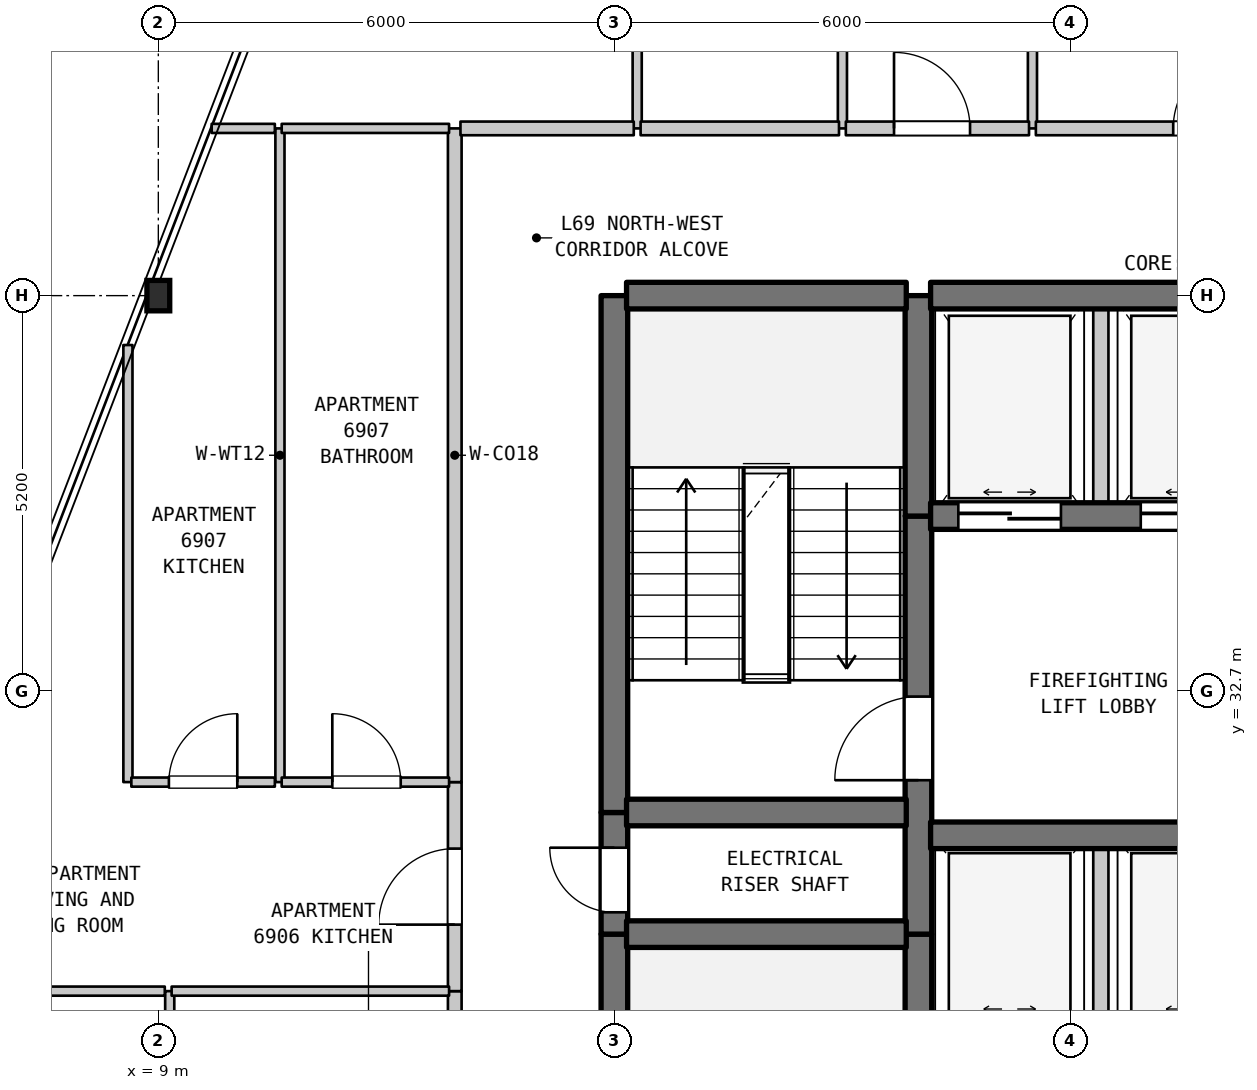
"""IFC4 building model, lengths in metres.
Left out: names, types, materials, properties, quantities, classifications, styles, units other than length and angle.
Written with IfcOpenShell. Run it as: python <this file> out.ifc"""

import sys

from ifc_helpers import new_model, si_unit, direction, frame, frame_2d, origin, origin_2d, place, context, subcontext, project, spatial, rectangle, i_section, extrude, element, fill, save


model = new_model("IFC4")
c1 = context("Model", 3, precision=1e-05, world=origin(), true_north=direction((0.0, 1.0)))
c2 = subcontext(c1, "Body", "Model", "MODEL_VIEW")
j1 = project(units=[si_unit("LENGTHUNIT", "METRE"), si_unit("PLANEANGLEUNIT", "RADIAN")], contexts=[c1])
p1 = place(None, origin())
s1 = spatial("IfcSite", under=j1, at=p1, CompositionType="ELEMENT")
p2 = place(p1, origin())
s2 = spatial("IfcBuilding", under=s1, at=p2, CompositionType="ELEMENT")
p3 = place(p2, frame((0.0, 0.0, 276.9)))
s3 = spatial("IfcBuildingStorey", under=s2, at=p3, CompositionType="ELEMENT", Elevation=276.9)
p4 = place(p3, frame((9.0, 37.9, 0.0), z_axis=(0.0, 0.0, 1.0), x_axis=(1.0, 0.0, 0.0)))
e1 = element("IfcColumn", 1, at=p4, inside=s3, PredefinedType="COLUMN", context=c2, shape_type="SweptSolid", body=[
    extrude(i_section(OverallWidth=0.3, OverallDepth=0.4, WebThickness=0.013, FlangeThickness=0.024, FilletRadius=0.027, at=origin_2d()), origin(), (0.0, 0.0, 1.0), 3.7),
])
p5 = place(p3, frame((8.6, 31.5, 0.0), z_axis=(0.0, 0.0, 1.0), x_axis=(0.0, 1.0, 0.0)))
e2 = element("IfcWall", 2, at=p5, inside=s3, PredefinedType="PARTITIONING", context=c2, shape_type="SweptSolid", body=[
    extrude(rectangle(XDim=5.75, YDim=0.12, at=frame_2d((2.875, 0.0))), origin(), (0.0, 0.0, 1.0), 3.39),
])
p6 = place(p3, frame((9.15, 28.4, 0.0), z_axis=(0.0, 0.0, 1.0), x_axis=(0.0, 1.0, 0.0)))
e3 = element("IfcWall", 3, at=p6, inside=s3, PredefinedType="PARTITIONING", context=c2, shape_type="SweptSolid", body=[
    extrude(rectangle(XDim=0.35, YDim=0.12, at=frame_2d((0.175, 0.0))), origin(), (0.0, 0.0, 1.0), 3.39),
])
p7 = place(p3, frame((10.6, 31.5, 0.0), z_axis=(0.0, 0.0, 1.0), x_axis=(0.0, 1.0, 0.0)))
e4 = element("IfcWall", 4, at=p7, inside=s3, PredefinedType="PARTITIONING", context=c2, shape_type="SweptSolid", body=[
    extrude(rectangle(XDim=8.6, YDim=0.12, at=frame_2d((4.3, 0.0))), origin(), (0.0, 0.0, 1.0), 3.39),
])
p8 = place(p3, frame((12.9, 28.4, 0.0), z_axis=(0.0, 0.0, 1.0), x_axis=(0.0, 1.0, 0.0)))
e5 = element("IfcWall", 5, at=p8, inside=s3, PredefinedType="STANDARD", context=c2, shape_type="SweptSolid", body=[
    extrude(rectangle(XDim=0.35, YDim=0.18, at=frame_2d((0.175, 0.0))), origin(), (0.0, 0.0, 1.0), 3.39),
])
p9 = place(p3, frame((12.9, 28.75, 0.0), z_axis=(0.0, 0.0, 1.0), x_axis=(0.0, 1.0, 0.0)))
e6 = element("IfcWall", 6, at=p9, inside=s3, PredefinedType="STANDARD", context=c2, shape_type="SweptSolid", body=[
    extrude(rectangle(XDim=2.75, YDim=0.18, at=frame_2d((1.375, 0.0))), origin(), (0.0, 0.0, 1.0), 3.39),
])
p10 = place(p9, frame((0.875, 0.0, 0.0)))
e7 = element("IfcOpeningElement", 7, at=p10, cuts=e6, PredefinedType="OPENING", context=c2, shape_type="SweptSolid", body=[
    extrude(rectangle(XDim=1.0, YDim=2.15, at=frame_2d((0.5, 1.075))), frame((0.0, 0.1, 0.0), z_axis=(0.0, -1.0, 0.0), x_axis=(1.0, 0.0, 0.0)), (0.0, 0.0, 1.0), 0.2),
])
p11 = place(p3, frame((12.9, 31.5, 0.0), z_axis=(0.0, 0.0, 1.0), x_axis=(0.0, 1.0, 0.0)))
e8 = element("IfcWall", 8, at=p11, inside=s3, PredefinedType="STANDARD", context=c2, shape_type="SweptSolid", body=[
    extrude(rectangle(XDim=8.6, YDim=0.18, at=frame_2d((4.3, 0.0))), origin(), (0.0, 0.0, 1.0), 3.39),
])
p12 = place(p3, frame((15.0, 22.7, 0.0), z_axis=(0.0, 0.0, 1.0), x_axis=(0.0, 1.0, 0.0)))
e9 = element("IfcWall", 9, at=p12, inside=s3, PredefinedType="SHEAR", context=c2, shape_type="SweptSolid", body=[
    extrude(rectangle(XDim=6.8, YDim=0.35, at=frame_2d((3.4, 0.0))), origin(), (0.0, 0.0, 1.0), 3.39),
])
p13 = place(p3, frame((15.0, 29.5, 0.0), z_axis=(0.0, 0.0, 1.0), x_axis=(0.0, 1.0, 0.0)))
e10 = element("IfcWall", 10, at=p13, inside=s3, PredefinedType="SHEAR", context=c2, shape_type="SweptSolid", body=[
    extrude(rectangle(XDim=1.6, YDim=0.35, at=frame_2d((0.8, 0.0))), origin(), (0.0, 0.0, 1.0), 3.39),
])
p14 = place(p13, frame((0.287, 0.0, 0.0)))
e11 = element("IfcOpeningElement", 11, at=p14, cuts=e10, PredefinedType="OPENING", context=c2, shape_type="SweptSolid", body=[
    extrude(rectangle(XDim=0.85, YDim=2.1, at=frame_2d((0.425, 1.05))), frame((0.0, 0.185, 0.0), z_axis=(0.0, -1.0, 0.0), x_axis=(1.0, 0.0, 0.0)), (0.0, 0.0, 1.0), 0.37),
])
p15 = place(p3, frame((15.0, 31.1, 0.0), z_axis=(0.0, 0.0, 1.0), x_axis=(0.0, 1.0, 0.0)))
e12 = element("IfcWall", 12, at=p15, inside=s3, PredefinedType="SHEAR", context=c2, shape_type="SweptSolid", body=[
    extrude(rectangle(XDim=6.8, YDim=0.35, at=frame_2d((3.4, 0.0))), origin(), (0.0, 0.0, 1.0), 3.39),
])
p16 = place(p3, frame((15.3, 40.1, 0.0), z_axis=(0.0, 0.0, 1.0), x_axis=(0.0, 1.0, 0.0)))
e13 = element("IfcWall", 13, at=p16, inside=s3, PredefinedType="PARTITIONING", context=c2, shape_type="SweptSolid", body=[
    extrude(rectangle(XDim=3.2, YDim=0.12, at=frame_2d((1.6, 0.0))), origin(), (0.0, 0.0, 1.0), 3.39),
])
p17 = place(p3, frame((18.0, 40.1, 0.0), z_axis=(0.0, 0.0, 1.0), x_axis=(0.0, 1.0, 0.0)))
e14 = element("IfcWall", 14, at=p17, inside=s3, PredefinedType="PARTITIONING", context=c2, shape_type="SweptSolid", body=[
    extrude(rectangle(XDim=3.2, YDim=0.12, at=frame_2d((1.6, 0.0))), origin(), (0.0, 0.0, 1.0), 3.39),
])
p18 = place(p17, frame((1.15, 0.0, 0.0)))
e15 = element("IfcOpeningElement", 15, at=p18, cuts=e14, PredefinedType="OPENING", context=c2, shape_type="SweptSolid", body=[
    extrude(rectangle(XDim=0.9, YDim=2.15, at=frame_2d((0.45, 1.075))), frame((0.0, 0.07, 0.0), z_axis=(0.0, -1.0, 0.0), x_axis=(1.0, 0.0, 0.0)), (0.0, 0.0, 1.0), 0.14),
])
p19 = place(p3, frame((19.0, 28.2, 0.0), z_axis=(0.0, 0.0, 1.0), x_axis=(0.0, 1.0, 0.0)))
e16 = element("IfcWall", 16, at=p19, inside=s3, PredefinedType="SHEAR", context=c2, shape_type="SweptSolid", body=[
    extrude(rectangle(XDim=1.3, YDim=0.35, at=frame_2d((0.65, 0.0))), origin(), (0.0, 0.0, 1.0), 3.39),
])
p20 = place(p3, frame((19.0, 29.5, 0.0), z_axis=(0.0, 0.0, 1.0), x_axis=(0.0, 1.0, 0.0)))
e17 = element("IfcWall", 17, at=p20, inside=s3, PredefinedType="SHEAR", context=c2, shape_type="SweptSolid", body=[
    extrude(rectangle(XDim=5.5, YDim=0.35, at=frame_2d((2.75, 0.0))), origin(), (0.0, 0.0, 1.0), 3.39),
])
p21 = place(p20, frame((2.025, 0.0, 0.0)))
e18 = element("IfcOpeningElement", 18, at=p21, cuts=e17, PredefinedType="OPENING", context=c2, shape_type="SweptSolid", body=[
    extrude(rectangle(XDim=1.1, YDim=2.15, at=frame_2d((0.55, 1.075))), frame((0.0, 0.185, 0.0), z_axis=(0.0, -1.0, 0.0), x_axis=(1.0, 0.0, 0.0)), (0.0, 0.0, 1.0), 0.37),
])
p22 = place(p3, frame((19.0, 35.0, 0.0), z_axis=(0.0, 0.0, 1.0), x_axis=(0.0, 1.0, 0.0)))
e19 = element("IfcWall", 19, at=p22, inside=s3, PredefinedType="SHEAR", context=c2, shape_type="SweptSolid", body=[
    extrude(rectangle(XDim=2.9, YDim=0.35, at=frame_2d((1.45, 0.0))), origin(), (0.0, 0.0, 1.0), 3.39),
])
p23 = place(p3, frame((20.5, 40.1, 0.0), z_axis=(0.0, 0.0, 1.0), x_axis=(0.0, 1.0, 0.0)))
e20 = element("IfcWall", 20, at=p23, inside=s3, PredefinedType="PARTITIONING", context=c2, shape_type="SweptSolid", body=[
    extrude(rectangle(XDim=2.05, YDim=0.12, at=frame_2d((1.025, 0.0))), origin(), (0.0, 0.0, 1.0), 3.39),
])
p24 = place(p3, frame((21.4, 28.2, 0.0), z_axis=(0.0, 0.0, 1.0), x_axis=(0.0, 1.0, 0.0)))
e21 = element("IfcWall", 21, at=p24, inside=s3, PredefinedType="STANDARD", context=c2, shape_type="SweptSolid", body=[
    extrude(rectangle(XDim=2.6, YDim=0.2, at=frame_2d((1.3, 0.0))), origin(), (0.0, 0.0, 1.0), 3.39),
])
p25 = place(p3, frame((21.4, 35.0, 0.0), z_axis=(0.0, 0.0, 1.0), x_axis=(0.0, 1.0, 0.0)))
e22 = element("IfcWall", 22, at=p25, inside=s3, PredefinedType="STANDARD", context=c2, shape_type="SweptSolid", body=[
    extrude(rectangle(XDim=2.9, YDim=0.2, at=frame_2d((1.45, 0.0))), origin(), (0.0, 0.0, 1.0), 3.39),
])
p26 = place(p3, frame((5.337, 28.75, 0.0), z_axis=(0.0, 0.0, 1.0), x_axis=(1.0, 0.0, 0.0)))
e23 = element("IfcWall", 23, at=p26, inside=s3, PredefinedType="PARTITIONING", context=c2, shape_type="SweptSolid", body=[
    extrude(rectangle(XDim=3.748, YDim=0.12, at=frame_2d((1.874, 0.0))), origin(), (0.0, 0.0, 1.0), 3.39),
])
p27 = place(p3, frame((9.175, 28.75, 0.0), z_axis=(0.0, 0.0, 1.0), x_axis=(1.0, 0.0, 0.0)))
e24 = element("IfcWall", 24, at=p27, inside=s3, PredefinedType="PARTITIONING", context=c2, shape_type="SweptSolid", body=[
    extrude(rectangle(XDim=3.65, YDim=0.12, at=frame_2d((1.825, 0.0))), origin(), (0.0, 0.0, 1.0), 3.39),
])
p28 = place(p3, frame((15.16, 29.5, 0.0), z_axis=(0.0, 0.0, 1.0), x_axis=(1.0, 0.0, 0.0)))
e25 = element("IfcWall", 25, at=p28, inside=s3, PredefinedType="SHEAR", context=c2, shape_type="SweptSolid", body=[
    extrude(rectangle(XDim=3.68, YDim=0.35, at=frame_2d((1.84, 0.0))), origin(), (0.0, 0.0, 1.0), 3.39),
])
p29 = place(p3, frame((19.16, 30.8, 0.0), z_axis=(0.0, 0.0, 1.0), x_axis=(1.0, 0.0, 0.0)))
e26 = element("IfcWall", 26, at=p29, inside=s3, PredefinedType="SHEAR", context=c2, shape_type="SweptSolid", body=[
    extrude(rectangle(XDim=4.48, YDim=0.35, at=frame_2d((2.24, 0.0))), origin(), (0.0, 0.0, 1.0), 3.39),
])
p30 = place(p3, frame((15.16, 31.1, 0.0), z_axis=(0.0, 0.0, 1.0), x_axis=(1.0, 0.0, 0.0)))
e27 = element("IfcWall", 27, at=p30, inside=s3, PredefinedType="SHEAR", context=c2, shape_type="SweptSolid", body=[
    extrude(rectangle(XDim=3.68, YDim=0.35, at=frame_2d((1.84, 0.0))), origin(), (0.0, 0.0, 1.0), 3.39),
])
p31 = place(p3, frame((8.645, 31.5, 0.0), z_axis=(0.0, 0.0, 1.0), x_axis=(1.0, 0.0, 0.0)))
e28 = element("IfcWall", 28, at=p31, inside=s3, PredefinedType="PARTITIONING", context=c2, shape_type="SweptSolid", body=[
    extrude(rectangle(XDim=1.888, YDim=0.12, at=frame_2d((0.944, 0.0))), origin(), (0.0, 0.0, 1.0), 3.39),
])
p32 = place(p31, frame((0.494, 0.0, 0.0)))
e29 = element("IfcOpeningElement", 29, at=p32, cuts=e28, PredefinedType="OPENING", context=c2, shape_type="SweptSolid", body=[
    extrude(rectangle(XDim=0.9, YDim=2.15, at=frame_2d((0.45, 1.075))), frame((0.0, 0.07, 0.0), z_axis=(0.0, -1.0, 0.0), x_axis=(1.0, 0.0, 0.0)), (0.0, 0.0, 1.0), 0.14),
])
p33 = place(p3, frame((10.623, 31.5, 0.0), z_axis=(0.0, 0.0, 1.0), x_axis=(1.0, 0.0, 0.0)))
e30 = element("IfcWall", 30, at=p33, inside=s3, PredefinedType="PARTITIONING", context=c2, shape_type="SweptSolid", body=[
    extrude(rectangle(XDim=2.202, YDim=0.12, at=frame_2d((1.101, 0.0))), origin(), (0.0, 0.0, 1.0), 3.39),
])
p34 = place(p33, frame((0.666, 0.0, 0.0)))
e31 = element("IfcOpeningElement", 31, at=p34, cuts=e30, PredefinedType="OPENING", context=c2, shape_type="SweptSolid", body=[
    extrude(rectangle(XDim=0.9, YDim=2.1, at=frame_2d((0.45, 1.05))), frame((0.0, 0.07, 0.0), z_axis=(0.0, -1.0, 0.0), x_axis=(1.0, 0.0, 0.0)), (0.0, 0.0, 1.0), 0.14),
])
p35 = place(p3, frame((19.16, 35.0, 0.0), z_axis=(0.0, 0.0, 1.0), x_axis=(1.0, 0.0, 0.0)))
e32 = element("IfcWall", 32, at=p35, inside=s3, PredefinedType="SHEAR", context=c2, shape_type="SweptSolid", body=[
    extrude(rectangle(XDim=4.48, YDim=0.35, at=frame_2d((2.24, 0.0))), origin(), (0.0, 0.0, 1.0), 3.39),
])
p36 = place(p35, frame((0.365, 0.0, 0.0)))
e33 = element("IfcOpeningElement", 33, at=p36, cuts=e32, PredefinedType="OPENING", context=c2, shape_type="SweptSolid", body=[
    extrude(rectangle(XDim=1.35, YDim=2.2, at=frame_2d((0.675, 1.1))), frame((0.0, 0.185, 0.0), z_axis=(0.0, -1.0, 0.0), x_axis=(1.0, 0.0, 0.0)), (0.0, 0.0, 1.0), 0.37),
])
p37 = place(p35, frame((2.765, 0.0, 0.0)))
e34 = element("IfcOpeningElement", 34, at=p37, cuts=e32, PredefinedType="OPENING", context=c2, shape_type="SweptSolid", body=[
    extrude(rectangle(XDim=1.35, YDim=2.2, at=frame_2d((0.675, 1.1))), frame((0.0, 0.185, 0.0), z_axis=(0.0, -1.0, 0.0), x_axis=(1.0, 0.0, 0.0)), (0.0, 0.0, 1.0), 0.37),
])
p38 = place(p3, frame((15.16, 37.9, 0.0), z_axis=(0.0, 0.0, 1.0), x_axis=(1.0, 0.0, 0.0)))
e35 = element("IfcWall", 35, at=p38, inside=s3, PredefinedType="SHEAR", context=c2, shape_type="SweptSolid", body=[
    extrude(rectangle(XDim=3.68, YDim=0.35, at=frame_2d((1.84, 0.0))), origin(), (0.0, 0.0, 1.0), 3.39),
])
p39 = place(p3, frame((19.16, 37.9, 0.0), z_axis=(0.0, 0.0, 1.0), x_axis=(1.0, 0.0, 0.0)))
e36 = element("IfcWall", 36, at=p39, inside=s3, PredefinedType="SHEAR", context=c2, shape_type="SweptSolid", body=[
    extrude(rectangle(XDim=4.48, YDim=0.35, at=frame_2d((2.24, 0.0))), origin(), (0.0, 0.0, 1.0), 3.39),
])
p40 = place(p3, frame((9.702, 40.1, 0.0), z_axis=(0.0, 0.0, 1.0), x_axis=(1.0, 0.0, 0.0)))
e37 = element("IfcWall", 37, at=p40, inside=s3, PredefinedType="PARTITIONING", context=c2, shape_type="SweptSolid", body=[
    extrude(rectangle(XDim=0.831, YDim=0.12, at=frame_2d((0.416, 0.0))), origin(), (0.0, 0.0, 1.0), 3.39),
])
p41 = place(p3, frame((10.623, 40.1, 0.0), z_axis=(0.0, 0.0, 1.0), x_axis=(1.0, 0.0, 0.0)))
e38 = element("IfcWall", 38, at=p41, inside=s3, PredefinedType="PARTITIONING", context=c2, shape_type="SweptSolid", body=[
    extrude(rectangle(XDim=2.202, YDim=0.12, at=frame_2d((1.101, 0.0))), origin(), (0.0, 0.0, 1.0), 3.39),
])
p42 = place(p3, frame((12.975, 40.1, 0.0), z_axis=(0.0, 0.0, 1.0), x_axis=(1.0, 0.0, 0.0)))
e39 = element("IfcWall", 39, at=p42, inside=s3, PredefinedType="STANDARD", context=c2, shape_type="SweptSolid", body=[
    extrude(rectangle(XDim=2.28, YDim=0.18, at=frame_2d((1.14, 0.0))), origin(), (0.0, 0.0, 1.0), 3.39),
])
p43 = place(p3, frame((15.345, 40.1, 0.0), z_axis=(0.0, 0.0, 1.0), x_axis=(1.0, 0.0, 0.0)))
e40 = element("IfcWall", 40, at=p43, inside=s3, PredefinedType="STANDARD", context=c2, shape_type="SweptSolid", body=[
    extrude(rectangle(XDim=2.61, YDim=0.18, at=frame_2d((1.305, 0.0))), origin(), (0.0, 0.0, 1.0), 3.39),
])
p44 = place(p3, frame((18.045, 40.1, 0.0), z_axis=(0.0, 0.0, 1.0), x_axis=(1.0, 0.0, 0.0)))
e41 = element("IfcWall", 41, at=p44, inside=s3, PredefinedType="STANDARD", context=c2, shape_type="SweptSolid", body=[
    extrude(rectangle(XDim=2.41, YDim=0.18, at=frame_2d((1.205, 0.0))), origin(), (0.0, 0.0, 1.0), 3.39),
])
p45 = place(p44, frame((0.634, 0.0, 0.0)))
e42 = element("IfcOpeningElement", 42, at=p45, cuts=e41, PredefinedType="OPENING", context=c2, shape_type="SweptSolid", body=[
    extrude(rectangle(XDim=1.0, YDim=2.15, at=frame_2d((0.5, 1.075))), frame((0.0, 0.1, 0.0), z_axis=(0.0, -1.0, 0.0), x_axis=(1.0, 0.0, 0.0)), (0.0, 0.0, 1.0), 0.2),
])
p46 = place(p3, frame((20.545, 40.1, 0.0), z_axis=(0.0, 0.0, 1.0), x_axis=(1.0, 0.0, 0.0)))
e43 = element("IfcWall", 43, at=p46, inside=s3, PredefinedType="STANDARD", context=c2, shape_type="SweptSolid", body=[
    extrude(rectangle(XDim=5.095, YDim=0.18, at=frame_2d((2.547, 0.0))), origin(), (0.0, 0.0, 1.0), 3.39),
])
p47 = place(p46, frame((1.807, 0.0, 0.0)))
e44 = element("IfcOpeningElement", 44, at=p47, cuts=e43, PredefinedType="OPENING", context=c2, shape_type="SweptSolid", body=[
    extrude(rectangle(XDim=1.0, YDim=2.15, at=frame_2d((0.5, 1.075))), frame((0.0, 0.1, 0.0), z_axis=(0.0, -1.0, 0.0), x_axis=(1.0, 0.0, 0.0)), (0.0, 0.0, 1.0), 0.2),
])
p48 = place(p10, origin())
e45 = element("IfcDoor", 45, at=p48, inside=s3, OperationType="SINGLE_SWING_LEFT", PredefinedType="DOOR", context=c2, shape_type="SweptSolid", body=[
    extrude(rectangle(XDim=1.0, YDim=2.15, at=frame_2d((0.5, 1.075))), frame((0.0, 0.025, 0.0), z_axis=(0.0, -1.0, 0.0), x_axis=(1.0, 0.0, 0.0)), (0.0, 0.0, 1.0), 0.05),
])
fill(e7, e45)
p49 = place(p14, origin())
e46 = element("IfcDoor", 46, at=p49, inside=s3, OperationType="SINGLE_SWING_RIGHT", PredefinedType="DOOR", context=c2, shape_type="SweptSolid", body=[
    extrude(rectangle(XDim=0.85, YDim=2.1, at=frame_2d((0.425, 1.05))), frame((0.0, 0.025, 0.0), z_axis=(0.0, -1.0, 0.0), x_axis=(1.0, 0.0, 0.0)), (0.0, 0.0, 1.0), 0.05),
])
fill(e11, e46)
p50 = place(p21, origin())
e47 = element("IfcDoor", 47, at=p50, inside=s3, OperationType="SINGLE_SWING_LEFT", PredefinedType="DOOR", context=c2, shape_type="SweptSolid", body=[
    extrude(rectangle(XDim=1.1, YDim=2.15, at=frame_2d((0.55, 1.075))), frame((0.0, 0.025, 0.0), z_axis=(0.0, -1.0, 0.0), x_axis=(1.0, 0.0, 0.0)), (0.0, 0.0, 1.0), 0.05),
])
fill(e18, e47)
p51 = place(p32, origin())
e48 = element("IfcDoor", 48, at=p51, inside=s3, OperationType="SINGLE_SWING_RIGHT", PredefinedType="DOOR", context=c2, shape_type="SweptSolid", body=[
    extrude(rectangle(XDim=0.9, YDim=2.15, at=frame_2d((0.45, 1.075))), frame((0.0, 0.025, 0.0), z_axis=(0.0, -1.0, 0.0), x_axis=(1.0, 0.0, 0.0)), (0.0, 0.0, 1.0), 0.05),
])
fill(e29, e48)
p52 = place(p34, origin())
e49 = element("IfcDoor", 49, at=p52, inside=s3, OperationType="SINGLE_SWING_LEFT", PredefinedType="DOOR", context=c2, shape_type="SweptSolid", body=[
    extrude(rectangle(XDim=0.9, YDim=2.1, at=frame_2d((0.45, 1.05))), frame((0.0, 0.025, 0.0), z_axis=(0.0, -1.0, 0.0), x_axis=(1.0, 0.0, 0.0)), (0.0, 0.0, 1.0), 0.05),
])
fill(e31, e49)
p53 = place(p36, origin())
e50 = element("IfcDoor", 50, at=p53, inside=s3, OperationType="DOUBLE_DOOR_SLIDING", PredefinedType="DOOR", context=c2, shape_type="SweptSolid", body=[
    extrude(rectangle(XDim=1.35, YDim=2.2, at=frame_2d((0.675, 1.1))), frame((0.0, 0.025, 0.0), z_axis=(0.0, -1.0, 0.0), x_axis=(1.0, 0.0, 0.0)), (0.0, 0.0, 1.0), 0.05),
])
fill(e33, e50)
p54 = place(p37, origin())
e51 = element("IfcDoor", 51, at=p54, inside=s3, OperationType="DOUBLE_DOOR_SLIDING", PredefinedType="DOOR", context=c2, shape_type="SweptSolid", body=[
    extrude(rectangle(XDim=1.35, YDim=2.2, at=frame_2d((0.675, 1.1))), frame((0.0, 0.025, 0.0), z_axis=(0.0, -1.0, 0.0), x_axis=(1.0, 0.0, 0.0)), (0.0, 0.0, 1.0), 0.05),
])
fill(e34, e51)
p55 = place(p45, origin())
e52 = element("IfcDoor", 52, at=p55, inside=s3, OperationType="SINGLE_SWING_LEFT", PredefinedType="DOOR", context=c2, shape_type="SweptSolid", body=[
    extrude(rectangle(XDim=1.0, YDim=2.15, at=frame_2d((0.5, 1.075))), frame((0.0, 0.025, 0.0), z_axis=(0.0, -1.0, 0.0), x_axis=(1.0, 0.0, 0.0)), (0.0, 0.0, 1.0), 0.05),
])
fill(e42, e52)
p56 = place(p47, origin())
e53 = element("IfcDoor", 53, at=p56, inside=s3, OperationType="SINGLE_SWING_RIGHT", PredefinedType="DOOR", context=c2, shape_type="SweptSolid", body=[
    extrude(rectangle(XDim=1.0, YDim=2.15, at=frame_2d((0.5, 1.075))), frame((0.0, 0.025, 0.0), z_axis=(0.0, -1.0, 0.0), x_axis=(1.0, 0.0, 0.0)), (0.0, 0.0, 1.0), 0.05),
])
fill(e44, e53)
save(model, sys.argv[1])
